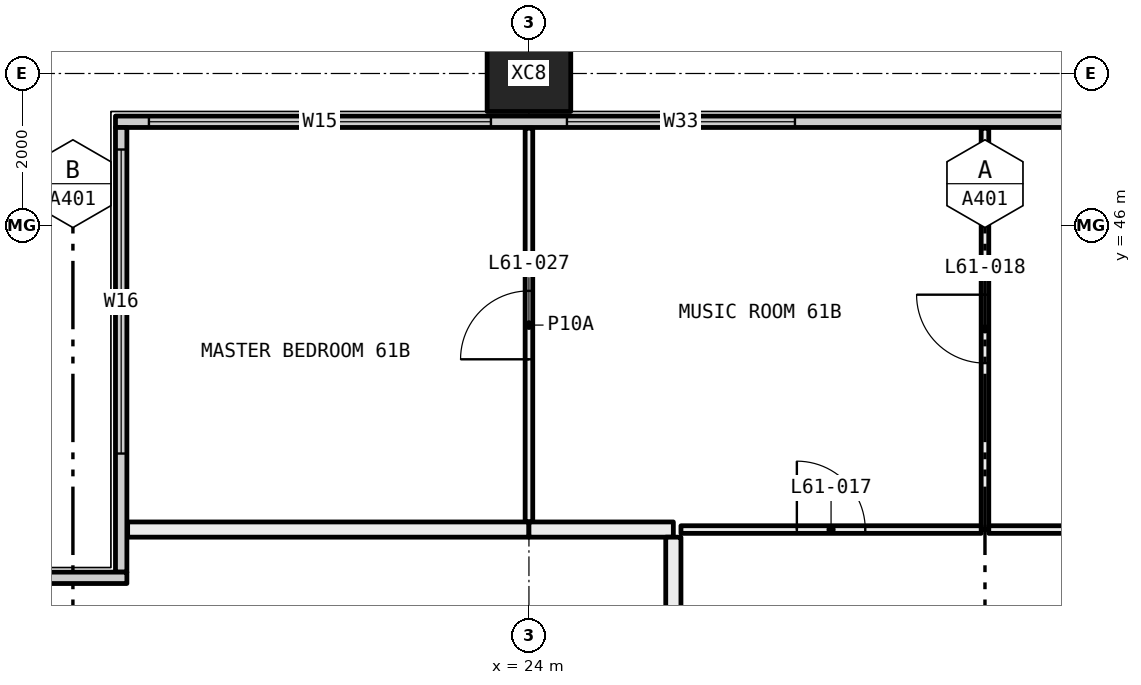
"""IFC4 building model, lengths in metres.
Left out: names, types, materials, properties, quantities, classifications, styles, units other than length and angle.
Written with IfcOpenShell. Run it as: python <this file> out.ifc"""

import sys

from ifc_helpers import new_model, si_unit, direction, frame, frame_2d, origin, origin_2d, place, context, subcontext, project, spatial, rectangle, hollow_rectangle, extrude, element, fill, save


model = new_model("IFC4")
c1 = context("Model", 3, precision=1e-05, world=origin(), true_north=direction((0.0, 1.0)))
c2 = subcontext(c1, "Body", "Model", "MODEL_VIEW")
j1 = project(units=[si_unit("LENGTHUNIT", "METRE"), si_unit("PLANEANGLEUNIT", "RADIAN")], contexts=[c1])
p1 = place(None, origin())
s1 = spatial("IfcSite", under=j1, at=p1, CompositionType="ELEMENT")
p2 = place(p1, origin())
s2 = spatial("IfcBuilding", under=s1, at=p2, CompositionType="ELEMENT")
p3 = place(p2, frame((0.0, 0.0, 228.3)))
s3 = spatial("IfcBuildingStorey", under=s2, at=p3, CompositionType="ELEMENT", Elevation=228.3)
p4 = place(p3, frame((24.0, 48.0, -0.4), z_axis=(0.0, 0.0, 1.0), x_axis=(1.0, 0.0, 0.0)))
e1 = element("IfcColumn", 1, at=p4, inside=s3, PredefinedType="COLUMN", context=c2, shape_type="SweptSolid", body=[
    extrude(hollow_rectangle(XDim=1.1, YDim=1.0, WallThickness=0.04, at=origin_2d()), origin(), (0.0, 0.0, 1.0), 3.45),
])
p5 = place(p3, frame((18.56, 47.365, 0.0), z_axis=(0.0, 0.0, 1.0), x_axis=(1.0, 0.0, 0.0)))
e2 = element("IfcWall", 2, at=p5, inside=s3, PredefinedType="ELEMENTEDWALL", context=c2, shape_type="SweptSolid", body=[
    extrude(rectangle(XDim=34.88, YDim=0.15, at=frame_2d((17.44, 0.0))), origin(), (0.0, 0.0, 1.0), 3.05),
])
p6 = place(p5, frame((0.44, 0.0, 0.45)))
e3 = element("IfcOpeningElement", 3, at=p6, cuts=e2, PredefinedType="OPENING", context=c2, shape_type="SweptSolid", body=[
    extrude(rectangle(XDim=4.5, YDim=2.55, at=frame_2d((2.25, 1.275))), frame((0.0, 0.085, 0.0), z_axis=(0.0, -1.0, 0.0), x_axis=(1.0, 0.0, 0.0)), (0.0, 0.0, 1.0), 0.17),
])
p7 = place(p5, frame((5.94, 0.0, 0.45)))
e4 = element("IfcOpeningElement", 4, at=p7, cuts=e2, PredefinedType="OPENING", context=c2, shape_type="SweptSolid", body=[
    extrude(rectangle(XDim=3.0, YDim=2.55, at=frame_2d((1.5, 1.275))), frame((0.0, 0.085, 0.0), z_axis=(0.0, -1.0, 0.0), x_axis=(1.0, 0.0, 0.0)), (0.0, 0.0, 1.0), 0.17),
])
p8 = place(p5, frame((14.94, 0.0, 0.45)))
e5 = element("IfcOpeningElement", 5, at=p8, cuts=e2, PredefinedType="OPENING", context=c2, shape_type="SweptSolid", body=[
    extrude(rectangle(XDim=2.0, YDim=2.55, at=frame_2d((1.0, 1.275))), frame((0.0, 0.085, 0.0), z_axis=(0.0, -1.0, 0.0), x_axis=(1.0, 0.0, 0.0)), (0.0, 0.0, 1.0), 0.17),
])
p9 = place(p5, frame((17.94, 0.0, 0.45)))
e6 = element("IfcOpeningElement", 6, at=p9, cuts=e2, PredefinedType="OPENING", context=c2, shape_type="SweptSolid", body=[
    extrude(rectangle(XDim=3.0, YDim=2.55, at=frame_2d((1.5, 1.275))), frame((0.0, 0.085, 0.0), z_axis=(0.0, -1.0, 0.0), x_axis=(1.0, 0.0, 0.0)), (0.0, 0.0, 1.0), 0.17),
])
p10 = place(p5, frame((25.94, 0.0, 0.45)))
e7 = element("IfcOpeningElement", 7, at=p10, cuts=e2, PredefinedType="OPENING", context=c2, shape_type="SweptSolid", body=[
    extrude(rectangle(XDim=3.0, YDim=2.55, at=frame_2d((1.5, 1.275))), frame((0.0, 0.085, 0.0), z_axis=(0.0, -1.0, 0.0), x_axis=(1.0, 0.0, 0.0)), (0.0, 0.0, 1.0), 0.17),
])
p11 = place(p5, frame((29.94, 0.0, 0.45)))
e8 = element("IfcOpeningElement", 8, at=p11, cuts=e2, PredefinedType="OPENING", context=c2, shape_type="SweptSolid", body=[
    extrude(rectangle(XDim=4.5, YDim=2.55, at=frame_2d((2.25, 1.275))), frame((0.0, 0.085, 0.0), z_axis=(0.0, -1.0, 0.0), x_axis=(1.0, 0.0, 0.0)), (0.0, 0.0, 1.0), 0.17),
])
p12 = place(p3, frame((18.635, 41.44, 0.0), z_axis=(0.0, 0.0, 1.0), x_axis=(0.0, 1.0, 0.0)))
e9 = element("IfcWall", 9, at=p12, inside=s3, PredefinedType="ELEMENTEDWALL", context=c2, shape_type="SweptSolid", body=[
    extrude(rectangle(XDim=5.85, YDim=0.15, at=frame_2d((2.925, 0.0))), origin(), (0.0, 0.0, 1.0), 3.05),
])
p13 = place(p12, frame((1.56, 0.0, 0.45)))
e10 = element("IfcOpeningElement", 10, at=p13, cuts=e9, PredefinedType="OPENING", context=c2, shape_type="SweptSolid", body=[
    extrude(rectangle(XDim=4.0, YDim=2.55, at=frame_2d((2.0, 1.275))), frame((0.0, 0.085, 0.0), z_axis=(0.0, -1.0, 0.0), x_axis=(1.0, 0.0, 0.0)), (0.0, 0.0, 1.0), 0.17),
])
p14 = place(p3, frame((12.56, 41.365, 0.0), z_axis=(0.0, 0.0, 1.0), x_axis=(1.0, 0.0, 0.0)))
e11 = element("IfcWall", 11, at=p14, inside=s3, PredefinedType="ELEMENTEDWALL", context=c2, shape_type="SweptSolid", body=[
    extrude(rectangle(XDim=6.15, YDim=0.15, at=frame_2d((3.075, 0.0))), origin(), (0.0, 0.0, 1.0), 3.05),
])
p15 = place(p14, frame((0.44, 0.0, 0.45)))
e12 = element("IfcOpeningElement", 12, at=p15, cuts=e11, PredefinedType="OPENING", context=c2, shape_type="SweptSolid", body=[
    extrude(rectangle(XDim=4.0, YDim=2.55, at=frame_2d((2.0, 1.275))), frame((0.0, 0.085, 0.0), z_axis=(0.0, -1.0, 0.0), x_axis=(1.0, 0.0, 0.0)), (0.0, 0.0, 1.0), 0.17),
])
p16 = place(p3, frame((24.0, 42.1, 0.0), z_axis=(0.0, 0.0, 1.0), x_axis=(0.0, 1.0, 0.0)))
e13 = element("IfcWall", 13, at=p16, inside=s3, PredefinedType="PARTITIONING", context=c2, shape_type="SweptSolid", body=[
    extrude(rectangle(XDim=5.18, YDim=0.1, at=frame_2d((2.59, 0.0))), origin(), (0.0, 0.0, 1.0), 3.05),
])
p17 = place(p16, frame((2.14, 0.0, 0.0)))
e14 = element("IfcOpeningElement", 14, at=p17, cuts=e13, PredefinedType="OPENING", context=c2, shape_type="SweptSolid", body=[
    extrude(rectangle(XDim=0.9, YDim=2.1, at=frame_2d((0.45, 1.05))), frame((0.0, 0.06, 0.0), z_axis=(0.0, -1.0, 0.0), x_axis=(1.0, 0.0, 0.0)), (0.0, 0.0, 1.0), 0.12),
])
p18 = place(p3, frame((18.72, 42.0, 0.0), z_axis=(0.0, 0.0, 1.0), x_axis=(1.0, 0.0, 0.0)))
e15 = element("IfcWall", 15, at=p18, inside=s3, PredefinedType="PARTITIONING", context=c2, shape_type="SweptSolid", body=[
    extrude(rectangle(XDim=5.28, YDim=0.2, at=frame_2d((2.64, 0.0))), origin(), (0.0, 0.0, 1.0), 3.05),
])
p19 = place(p3, frame((30.0, 42.0, 0.0), z_axis=(0.0, 0.0, 1.0), x_axis=(0.0, 1.0, 0.0)))
e16 = element("IfcWall", 16, at=p19, inside=s3, PredefinedType="PARTITIONING", context=c2, shape_type="SweptSolid", body=[
    extrude(rectangle(XDim=5.28, YDim=0.1, at=frame_2d((2.64, 0.0))), origin(), (0.0, 0.0, 1.0), 3.05),
])
p20 = place(p19, frame((2.19, 0.0, 0.0)))
e17 = element("IfcOpeningElement", 17, at=p20, cuts=e16, PredefinedType="OPENING", context=c2, shape_type="SweptSolid", body=[
    extrude(rectangle(XDim=0.9, YDim=2.1, at=frame_2d((0.45, 1.05))), frame((0.0, 0.06, 0.0), z_axis=(0.0, -1.0, 0.0), x_axis=(1.0, 0.0, 0.0)), (0.0, 0.0, 1.0), 0.12),
])
p21 = place(p3, frame((26.0, 42.0, 0.0), z_axis=(0.0, 0.0, 1.0), x_axis=(1.0, 0.0, 0.0)))
e18 = element("IfcWall", 18, at=p21, inside=s3, PredefinedType="PARTITIONING", context=c2, shape_type="SweptSolid", body=[
    extrude(rectangle(XDim=3.95, YDim=0.1, at=frame_2d((1.975, 0.0))), origin(), (0.0, 0.0, 1.0), 3.05),
])
p22 = place(p21, frame((1.525, 0.0, 0.0)))
e19 = element("IfcOpeningElement", 19, at=p22, cuts=e18, PredefinedType="OPENING", context=c2, shape_type="SweptSolid", body=[
    extrude(rectangle(XDim=0.9, YDim=2.1, at=frame_2d((0.45, 1.05))), frame((0.0, 0.06, 0.0), z_axis=(0.0, -1.0, 0.0), x_axis=(1.0, 0.0, 0.0)), (0.0, 0.0, 1.0), 0.12),
])
p23 = place(p3, frame((24.0, 42.0, 0.0), z_axis=(0.0, 0.0, 1.0), x_axis=(1.0, 0.0, 0.0)))
e20 = element("IfcWall", 20, at=p23, inside=s3, PredefinedType="PARTITIONING", context=c2, shape_type="SweptSolid", body=[
    extrude(rectangle(XDim=1.9, YDim=0.2, at=frame_2d((0.95, 0.0))), origin(), (0.0, 0.0, 1.0), 3.05),
])
p24 = place(p3, frame((30.05, 42.0, 0.0), z_axis=(0.0, 0.0, 1.0), x_axis=(1.0, 0.0, 0.0)))
e21 = element("IfcWall", 21, at=p24, inside=s3, PredefinedType="PARTITIONING", context=c2, shape_type="SweptSolid", body=[
    extrude(rectangle(XDim=1.45, YDim=0.1, at=frame_2d((0.725, 0.0))), origin(), (0.0, 0.0, 1.0), 3.05),
])
p25 = place(p3, frame((25.9, 41.9, 0.0), z_axis=(0.0, 0.0, 1.0), x_axis=(0.0, -1.0, 0.0)))
e22 = element("IfcWall", 22, at=p25, inside=s3, PredefinedType="PARTITIONING", context=c2, shape_type="SweptSolid", body=[
    extrude(rectangle(XDim=6.2, YDim=0.2, at=frame_2d((3.1, 0.0))), origin(), (0.0, 0.0, 1.0), 2.45),
])
p26 = place(p6, origin())
e23 = element("IfcWindow", 23, at=p26, inside=s3, PartitioningType="SINGLE_PANEL", PredefinedType="WINDOW", context=c2, shape_type="SweptSolid", body=[
    extrude(rectangle(XDim=4.5, YDim=2.55, at=frame_2d((2.25, 1.275))), frame((0.0, 0.03, 0.0), z_axis=(0.0, -1.0, 0.0), x_axis=(1.0, 0.0, 0.0)), (0.0, 0.0, 1.0), 0.06),
])
fill(e3, e23)
p27 = place(p7, origin())
e24 = element("IfcWindow", 24, at=p27, inside=s3, PartitioningType="SINGLE_PANEL", PredefinedType="WINDOW", context=c2, shape_type="SweptSolid", body=[
    extrude(rectangle(XDim=3.0, YDim=2.55, at=frame_2d((1.5, 1.275))), frame((0.0, 0.03, 0.0), z_axis=(0.0, -1.0, 0.0), x_axis=(1.0, 0.0, 0.0)), (0.0, 0.0, 1.0), 0.06),
])
fill(e4, e24)
p28 = place(p13, origin())
e25 = element("IfcWindow", 25, at=p28, inside=s3, PartitioningType="SINGLE_PANEL", PredefinedType="WINDOW", context=c2, shape_type="SweptSolid", body=[
    extrude(rectangle(XDim=4.0, YDim=2.55, at=frame_2d((2.0, 1.275))), frame((0.0, 0.03, 0.0), z_axis=(0.0, -1.0, 0.0), x_axis=(1.0, 0.0, 0.0)), (0.0, 0.0, 1.0), 0.06),
])
fill(e10, e25)
p29 = place(p22, origin())
e26 = element("IfcDoor", 26, at=p29, inside=s3, OperationType="SINGLE_SWING_RIGHT", PredefinedType="DOOR", context=c2, shape_type="SweptSolid", body=[
    extrude(rectangle(XDim=0.9, YDim=2.1, at=frame_2d((0.45, 1.05))), frame((0.0, 0.025, 0.0), z_axis=(0.0, -1.0, 0.0), x_axis=(1.0, 0.0, 0.0)), (0.0, 0.0, 1.0), 0.05),
])
fill(e19, e26)
p30 = place(p20, origin())
e27 = element("IfcDoor", 27, at=p30, inside=s3, OperationType="SINGLE_SWING_LEFT", PredefinedType="DOOR", context=c2, shape_type="SweptSolid", body=[
    extrude(rectangle(XDim=0.9, YDim=2.1, at=frame_2d((0.45, 1.05))), frame((0.0, 0.025, 0.0), z_axis=(0.0, -1.0, 0.0), x_axis=(1.0, 0.0, 0.0)), (0.0, 0.0, 1.0), 0.05),
])
fill(e17, e27)
p31 = place(p17, origin())
e28 = element("IfcDoor", 28, at=p31, inside=s3, OperationType="SINGLE_SWING_RIGHT", PredefinedType="DOOR", context=c2, shape_type="SweptSolid", body=[
    extrude(rectangle(XDim=0.9, YDim=2.1, at=frame_2d((0.45, 1.05))), frame((0.0, 0.025, 0.0), z_axis=(0.0, -1.0, 0.0), x_axis=(1.0, 0.0, 0.0)), (0.0, 0.0, 1.0), 0.05),
])
fill(e14, e28)
save(model, sys.argv[1])
